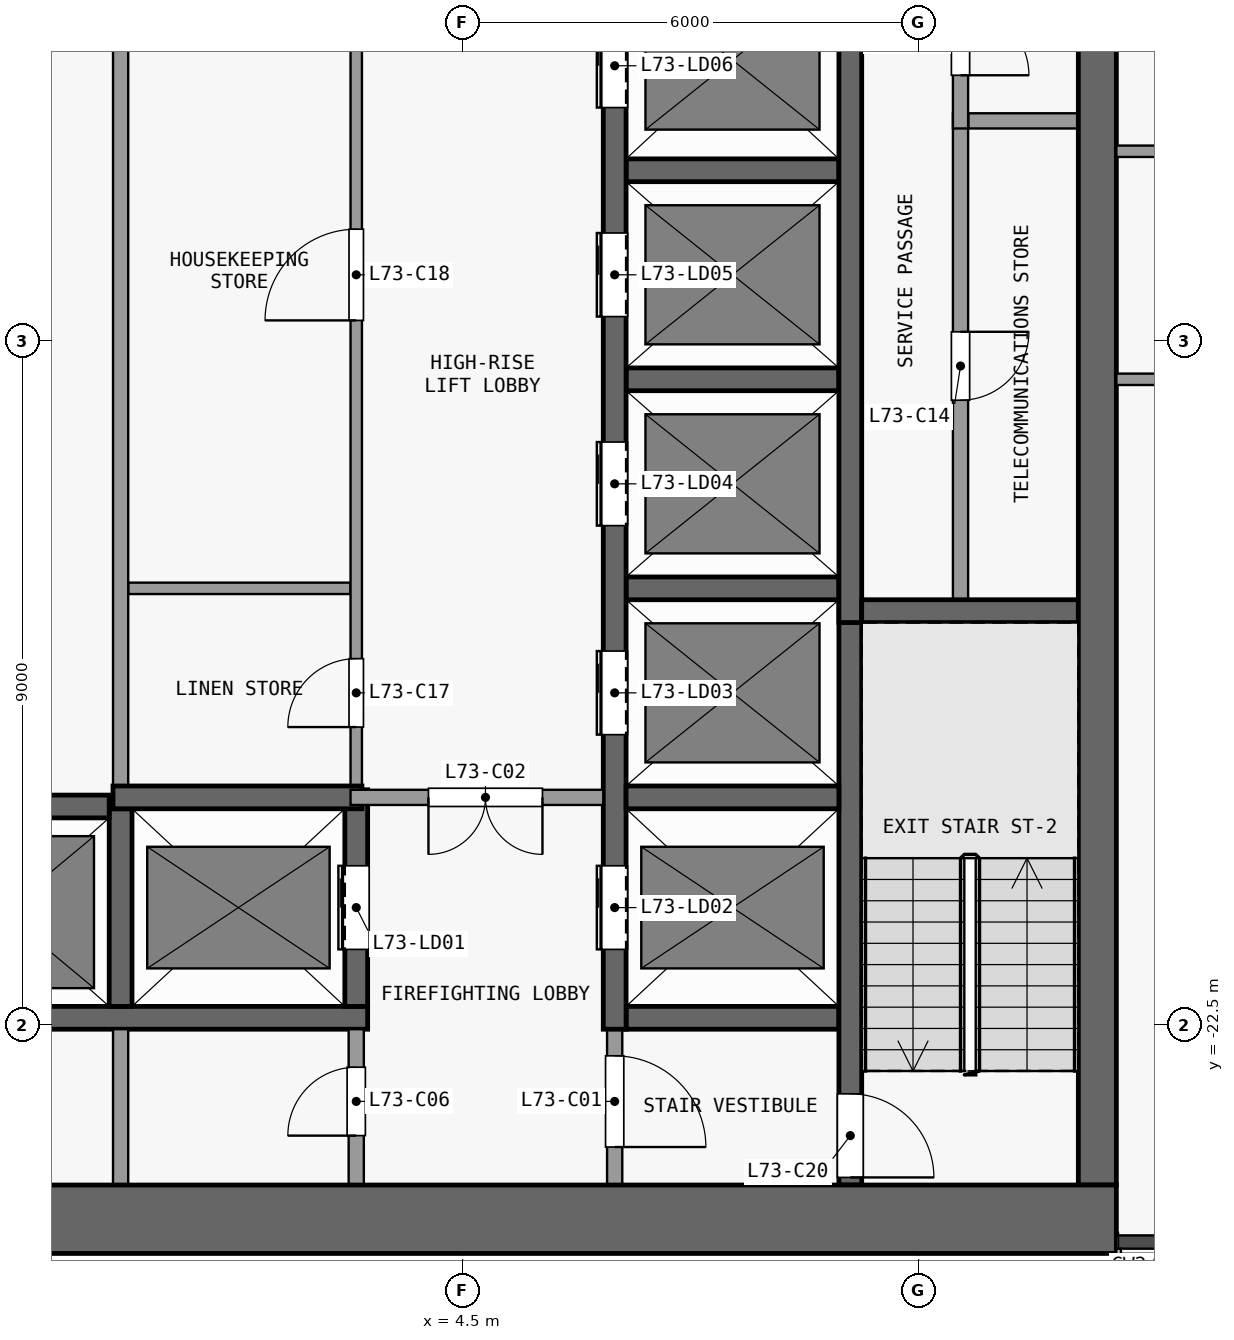
"""IFC4 building model, lengths in metres.
Left out: names, types, materials, properties, quantities, classifications, styles, units other than length and angle.
Written with IfcOpenShell. Run it as: python <this file> out.ifc"""

import sys

from ifc_helpers import new_model, si_unit, direction, frame, frame_2d, origin, place, context, subcontext, project, spatial, rectangle, extrude, element, fill, save


model = new_model("IFC4")
c1 = context("Model", 3, precision=1e-05, world=origin(), true_north=direction((0.0, 1.0)))
c2 = subcontext(c1, "Body", "Model", "MODEL_VIEW")
j1 = project(units=[si_unit("LENGTHUNIT", "METRE"), si_unit("PLANEANGLEUNIT", "RADIAN")], contexts=[c1])
p1 = place(None, origin())
s1 = spatial("IfcSite", under=j1, at=p1, CompositionType="ELEMENT")
p2 = place(p1, origin())
s2 = spatial("IfcBuilding", under=s1, at=p2, CompositionType="ELEMENT")
p3 = place(p2, frame((0.0, 0.0, 287.9)))
s3 = spatial("IfcBuildingStorey", under=s2, at=p3, CompositionType="ELEMENT", Elevation=287.9)
p4 = place(p3, frame((-13.1, -25.05, 0.0), z_axis=(0.0, 0.0, 1.0), x_axis=(1.0, 0.0, 0.0)))
e1 = element("IfcWall", 1, at=p4, inside=s3, PredefinedType="SHEAR", context=c2, shape_type="SweptSolid", body=[
    extrude(rectangle(XDim=26.2, YDim=0.9, at=frame_2d((13.1, 0.0))), origin(), (0.0, 0.0, 1.0), 3.3),
])
p5 = place(p3, frame((12.85, -24.6, 0.0), z_axis=(0.0, 0.0, 1.0), x_axis=(0.0, 1.0, 0.0)))
e2 = element("IfcWall", 2, at=p5, inside=s3, PredefinedType="SHEAR", context=c2, shape_type="SweptSolid", body=[
    extrude(rectangle(XDim=16.1, YDim=0.5, at=frame_2d((8.05, 0.0))), origin(), (0.0, 0.0, 1.0), 3.3),
])
p6 = place(p3, frame((-3.25, -22.4, 0.0), z_axis=(0.0, 0.0, 1.0), x_axis=(1.0, 0.0, 0.0)))
e3 = element("IfcWall", 3, at=p6, inside=s3, PredefinedType="SHEAR", context=c2, shape_type="SweptSolid", body=[
    extrude(rectangle(XDim=6.5, YDim=0.3, at=frame_2d((3.25, 0.0))), origin(), (0.0, 0.0, 1.0), 3.3),
])
p7 = place(p3, frame((6.65, -22.4, 0.0), z_axis=(0.0, 0.0, 1.0), x_axis=(1.0, 0.0, 0.0)))
e4 = element("IfcWall", 4, at=p7, inside=s3, PredefinedType="SHEAR", context=c2, shape_type="SweptSolid", body=[
    extrude(rectangle(XDim=2.8, YDim=0.3, at=frame_2d((1.4, 0.0))), origin(), (0.0, 0.0, 1.0), 3.3),
])
p8 = place(p3, frame((-3.2, -19.62, 0.0), z_axis=(0.0, 0.0, 1.0), x_axis=(1.0, 0.0, 0.0)))
e5 = element("IfcWall", 5, at=p8, inside=s3, PredefinedType="SHEAR", context=c2, shape_type="SweptSolid", body=[
    extrude(rectangle(XDim=3.05, YDim=0.3, at=frame_2d((1.525, 0.0))), origin(), (0.0, 0.0, 1.0), 3.3),
])
p9 = place(p3, frame((-0.1, -19.5, 0.0), z_axis=(0.0, 0.0, 1.0), x_axis=(1.0, 0.0, 0.0)))
e6 = element("IfcWall", 6, at=p9, inside=s3, PredefinedType="SHEAR", context=c2, shape_type="SweptSolid", body=[
    extrude(rectangle(XDim=3.275, YDim=0.3, at=frame_2d((1.638, 0.0))), origin(), (0.0, 0.0, 1.0), 3.3),
])
p10 = place(p3, frame((6.35, -19.5, 0.0), z_axis=(0.0, 0.0, 1.0), x_axis=(-1.0, 0.0, 0.0)))
e7 = element("IfcWall", 7, at=p10, inside=s3, PredefinedType="PARTITIONING", context=c2, shape_type="SweptSolid", body=[
    extrude(rectangle(XDim=3.325, YDim=0.2, at=frame_2d((1.663, 0.0))), origin(), (0.0, 0.0, 1.0), 3.3),
])
p11 = place(p10, frame((0.8, 0.0, 0.0)))
e8 = element("IfcOpeningElement", 8, at=p11, cuts=e7, PredefinedType="OPENING", context=c2, shape_type="SweptSolid", body=[
    extrude(rectangle(XDim=1.5, YDim=2.1, at=frame_2d((0.75, 1.05))), frame((0.0, 0.11, 0.0), z_axis=(0.0, -1.0, 0.0), x_axis=(1.0, 0.0, 0.0)), (0.0, 0.0, 1.0), 0.22),
])
p12 = place(p3, frame((6.65, -19.5, 0.0), z_axis=(0.0, 0.0, 1.0), x_axis=(1.0, 0.0, 0.0)))
e9 = element("IfcWall", 9, at=p12, inside=s3, PredefinedType="SHEAR", context=c2, shape_type="SweptSolid", body=[
    extrude(rectangle(XDim=2.8, YDim=0.3, at=frame_2d((1.4, 0.0))), origin(), (0.0, 0.0, 1.0), 3.3),
])
p13 = place(p3, frame((9.75, -17.05, 0.0), z_axis=(0.0, 0.0, 1.0), x_axis=(1.0, 0.0, 0.0)))
e10 = element("IfcWall", 10, at=p13, inside=s3, PredefinedType="SHEAR", context=c2, shape_type="SweptSolid", body=[
    extrude(rectangle(XDim=2.85, YDim=0.3, at=frame_2d((1.425, 0.0))), origin(), (0.0, 0.0, 1.0), 3.3),
])
p14 = place(p3, frame((0.1, -16.75, 0.0), z_axis=(0.0, 0.0, 1.0), x_axis=(1.0, 0.0, 0.0)))
e11 = element("IfcWall", 11, at=p14, inside=s3, PredefinedType="PARTITIONING", context=c2, shape_type="SweptSolid", body=[
    extrude(rectangle(XDim=2.925, YDim=0.15, at=frame_2d((1.462, 0.0))), origin(), (0.0, 0.0, 1.0), 3.3),
])
for number, where, z_axis, x_axis in (
    (12, (6.65, -16.75, 0.0), (0.0, 0.0, 1.0), (1.0, 0.0, 0.0)),
    (13, (6.65, -14.0, 0.0), (0.0, 0.0, 1.0), (1.0, 0.0, 0.0)),
    (14, (6.65, -11.25, 0.0), (0.0, 0.0, 1.0), (1.0, 0.0, 0.0)),
):
    element("IfcWall", number, at=place(p3, frame(where, z_axis=z_axis, x_axis=x_axis)), inside=s3, PredefinedType="SHEAR", context=c2, shape_type="SweptSolid", body=[
        extrude(rectangle(XDim=2.8, YDim=0.3, at=frame_2d((1.4, 0.0))), origin(), (0.0, 0.0, 1.0), 3.3),
    ])
p15 = place(p3, frame((11.15, -10.6, 0.0), z_axis=(0.0, 0.0, 1.0), x_axis=(1.0, 0.0, 0.0)))
e15 = element("IfcWall", 15, at=p15, inside=s3, PredefinedType="PARTITIONING", context=c2, shape_type="SweptSolid", body=[
    extrude(rectangle(XDim=1.45, YDim=0.2, at=frame_2d((0.725, 0.0))), origin(), (0.0, 0.0, 1.0), 3.3),
])
p16 = place(p3, frame((0.0, -24.6, 0.0), z_axis=(0.0, 0.0, 1.0), x_axis=(0.0, 1.0, 0.0)))
e16 = element("IfcWall", 16, at=p16, inside=s3, PredefinedType="PARTITIONING", context=c2, shape_type="SweptSolid", body=[
    extrude(rectangle(XDim=2.05, YDim=0.2, at=frame_2d((1.025, 0.0))), origin(), (0.0, 0.0, 1.0), 3.3),
])
p17 = place(p3, frame((0.0, -22.25, 0.0), z_axis=(0.0, 0.0, 1.0), x_axis=(0.0, 1.0, 0.0)))
e17 = element("IfcWall", 17, at=p17, inside=s3, PredefinedType="SHEAR", context=c2, shape_type="SweptSolid", body=[
    extrude(rectangle(XDim=2.6, YDim=0.3, at=frame_2d((1.3, 0.0))), origin(), (0.0, 0.0, 1.0), 3.3),
])
p18 = place(p3, frame((0.0, -19.35, 0.0), z_axis=(0.0, 0.0, 1.0), x_axis=(0.0, 1.0, 0.0)))
e18 = element("IfcWall", 18, at=p18, inside=s3, PredefinedType="PARTITIONING", context=c2, shape_type="SweptSolid", body=[
    extrude(rectangle(XDim=10.85, YDim=0.2, at=frame_2d((5.425, 0.0))), origin(), (0.0, 0.0, 1.0), 3.3),
])
p19 = place(p3, frame((3.1, -24.6, 0.0), z_axis=(0.0, 0.0, 1.0), x_axis=(0.0, 1.0, 0.0)))
e19 = element("IfcWall", 19, at=p19, inside=s3, PredefinedType="PARTITIONING", context=c2, shape_type="SweptSolid", body=[
    extrude(rectangle(XDim=2.05, YDim=0.2, at=frame_2d((1.025, 0.0))), origin(), (0.0, 0.0, 1.0), 3.3),
])
p20 = place(p19, frame((0.65, 0.0, 0.0)))
e20 = element("IfcOpeningElement", 20, at=p20, cuts=e19, PredefinedType="OPENING", context=c2, shape_type="SweptSolid", body=[
    extrude(rectangle(XDim=0.9, YDim=2.1, at=frame_2d((0.45, 1.05))), frame((0.0, 0.11, 0.0), z_axis=(0.0, -1.0, 0.0), x_axis=(1.0, 0.0, 0.0)), (0.0, 0.0, 1.0), 0.22),
])
p21 = place(p3, frame((3.1, -22.25, 0.0), z_axis=(0.0, 0.0, 1.0), x_axis=(0.0, 1.0, 0.0)))
e21 = element("IfcWall", 21, at=p21, inside=s3, PredefinedType="SHEAR", context=c2, shape_type="SweptSolid", body=[
    extrude(rectangle(XDim=2.85, YDim=0.3, at=frame_2d((1.425, 0.0))), origin(), (0.0, 0.0, 1.0), 3.3),
])
p22 = place(p21, frame((0.75, 0.0, 0.0)))
e22 = element("IfcOpeningElement", 22, at=p22, cuts=e21, PredefinedType="OPENING", context=c2, shape_type="SweptSolid", body=[
    extrude(rectangle(XDim=1.1, YDim=2.1, at=frame_2d((0.55, 1.05))), frame((0.0, 0.16, 0.0), z_axis=(0.0, -1.0, 0.0), x_axis=(1.0, 0.0, 0.0)), (0.0, 0.0, 1.0), 0.32),
])
p23 = place(p3, frame((3.1, -19.4, 0.0), z_axis=(0.0, 0.0, 1.0), x_axis=(0.0, 1.0, 0.0)))
e23 = element("IfcWall", 23, at=p23, inside=s3, PredefinedType="PARTITIONING", context=c2, shape_type="SweptSolid", body=[
    extrude(rectangle(XDim=10.9, YDim=0.15, at=frame_2d((5.45, 0.0))), origin(), (0.0, 0.0, 1.0), 3.3),
])
p24 = place(p23, frame((0.825, 0.0, 0.0)))
e24 = element("IfcOpeningElement", 24, at=p24, cuts=e23, PredefinedType="OPENING", context=c2, shape_type="SweptSolid", body=[
    extrude(rectangle(XDim=0.9, YDim=2.1, at=frame_2d((0.45, 1.05))), frame((0.0, 0.085, 0.0), z_axis=(0.0, -1.0, 0.0), x_axis=(1.0, 0.0, 0.0)), (0.0, 0.0, 1.0), 0.17),
])
p25 = place(p23, frame((6.175, 0.0, 0.0)))
e25 = element("IfcOpeningElement", 25, at=p25, cuts=e23, PredefinedType="OPENING", context=c2, shape_type="SweptSolid", body=[
    extrude(rectangle(XDim=1.2, YDim=2.1, at=frame_2d((0.6, 1.05))), frame((0.0, 0.085, 0.0), z_axis=(0.0, -1.0, 0.0), x_axis=(1.0, 0.0, 0.0)), (0.0, 0.0, 1.0), 0.17),
])
p26 = place(p3, frame((6.5, -22.55, 0.0), z_axis=(0.0, 0.0, 1.0), x_axis=(0.0, -1.0, 0.0)))
e26 = element("IfcWall", 26, at=p26, inside=s3, PredefinedType="PARTITIONING", context=c2, shape_type="SweptSolid", body=[
    extrude(rectangle(XDim=2.05, YDim=0.2, at=frame_2d((1.025, 0.0))), origin(), (0.0, 0.0, 1.0), 3.3),
])
p27 = place(p26, frame((0.35, 0.0, 0.0)))
e27 = element("IfcOpeningElement", 27, at=p27, cuts=e26, PredefinedType="OPENING", context=c2, shape_type="SweptSolid", body=[
    extrude(rectangle(XDim=1.2, YDim=2.1, at=frame_2d((0.6, 1.05))), frame((0.0, 0.11, 0.0), z_axis=(0.0, -1.0, 0.0), x_axis=(1.0, 0.0, 0.0)), (0.0, 0.0, 1.0), 0.22),
])
p28 = place(p3, frame((6.5, -22.55, 0.0), z_axis=(0.0, 0.0, 1.0), x_axis=(0.0, 1.0, 0.0)))
e28 = element("IfcWall", 28, at=p28, inside=s3, PredefinedType="SHEAR", context=c2, shape_type="SweptSolid", body=[
    extrude(rectangle(XDim=14.05, YDim=0.3, at=frame_2d((7.025, 0.0))), origin(), (0.0, 0.0, 1.0), 3.3),
])
p29 = place(p28, frame((1.05, 0.0, 0.0)))
e29 = element("IfcOpeningElement", 29, at=p29, cuts=e28, PredefinedType="OPENING", context=c2, shape_type="SweptSolid", body=[
    extrude(rectangle(XDim=1.1, YDim=2.1, at=frame_2d((0.55, 1.05))), frame((0.0, 0.16, 0.0), z_axis=(0.0, -1.0, 0.0), x_axis=(1.0, 0.0, 0.0)), (0.0, 0.0, 1.0), 0.32),
])
p30 = place(p28, frame((3.875, 0.0, 0.0)))
e30 = element("IfcOpeningElement", 30, at=p30, cuts=e28, PredefinedType="OPENING", context=c2, shape_type="SweptSolid", body=[
    extrude(rectangle(XDim=1.1, YDim=2.1, at=frame_2d((0.55, 1.05))), frame((0.0, 0.16, 0.0), z_axis=(0.0, -1.0, 0.0), x_axis=(1.0, 0.0, 0.0)), (0.0, 0.0, 1.0), 0.32),
])
p31 = place(p28, frame((6.625, 0.0, 0.0)))
e31 = element("IfcOpeningElement", 31, at=p31, cuts=e28, PredefinedType="OPENING", context=c2, shape_type="SweptSolid", body=[
    extrude(rectangle(XDim=1.1, YDim=2.1, at=frame_2d((0.55, 1.05))), frame((0.0, 0.16, 0.0), z_axis=(0.0, -1.0, 0.0), x_axis=(1.0, 0.0, 0.0)), (0.0, 0.0, 1.0), 0.32),
])
p32 = place(p28, frame((9.375, 0.0, 0.0)))
e32 = element("IfcOpeningElement", 32, at=p32, cuts=e28, PredefinedType="OPENING", context=c2, shape_type="SweptSolid", body=[
    extrude(rectangle(XDim=1.1, YDim=2.1, at=frame_2d((0.55, 1.05))), frame((0.0, 0.16, 0.0), z_axis=(0.0, -1.0, 0.0), x_axis=(1.0, 0.0, 0.0)), (0.0, 0.0, 1.0), 0.32),
])
p33 = place(p28, frame((12.125, 0.0, 0.0)))
e33 = element("IfcOpeningElement", 33, at=p33, cuts=e28, PredefinedType="OPENING", context=c2, shape_type="SweptSolid", body=[
    extrude(rectangle(XDim=1.1, YDim=2.1, at=frame_2d((0.55, 1.05))), frame((0.0, 0.16, 0.0), z_axis=(0.0, -1.0, 0.0), x_axis=(1.0, 0.0, 0.0)), (0.0, 0.0, 1.0), 0.32),
])
p34 = place(p3, frame((9.6, -16.9, 0.0), z_axis=(0.0, 0.0, 1.0), x_axis=(0.0, -1.0, 0.0)))
e34 = element("IfcWall", 34, at=p34, inside=s3, PredefinedType="SHEAR", context=c2, shape_type="SweptSolid", body=[
    extrude(rectangle(XDim=7.7, YDim=0.3, at=frame_2d((3.85, 0.0))), origin(), (0.0, 0.0, 1.0), 3.3),
])
p35 = place(p34, frame((6.5, 0.0, 0.0)))
e35 = element("IfcOpeningElement", 35, at=p35, cuts=e34, PredefinedType="OPENING", context=c2, shape_type="SweptSolid", body=[
    extrude(rectangle(XDim=1.1, YDim=2.1, at=frame_2d((0.55, 1.05))), frame((0.0, 0.16, 0.0), z_axis=(0.0, -1.0, 0.0), x_axis=(1.0, 0.0, 0.0)), (0.0, 0.0, 1.0), 0.32),
])
p36 = place(p3, frame((9.6, -17.2, 0.0), z_axis=(0.0, 0.0, 1.0), x_axis=(0.0, 1.0, 0.0)))
e36 = element("IfcWall", 36, at=p36, inside=s3, PredefinedType="SHEAR", context=c2, shape_type="SweptSolid", body=[
    extrude(rectangle(XDim=8.7, YDim=0.3, at=frame_2d((4.35, 0.0))), origin(), (0.0, 0.0, 1.0), 3.3),
])
p37 = place(p3, frame((11.05, -10.5, 0.0), z_axis=(0.0, 0.0, 1.0), x_axis=(0.0, -1.0, 0.0)))
e37 = element("IfcWall", 37, at=p37, inside=s3, PredefinedType="PARTITIONING", context=c2, shape_type="SweptSolid", body=[
    extrude(rectangle(XDim=6.4, YDim=0.2, at=frame_2d((3.2, 0.0))), origin(), (0.0, 0.0, 1.0), 3.3),
])
p38 = place(p37, frame((2.875, 0.0, 0.0)))
e38 = element("IfcOpeningElement", 38, at=p38, cuts=e37, PredefinedType="OPENING", context=c2, shape_type="SweptSolid", body=[
    extrude(rectangle(XDim=0.9, YDim=2.1, at=frame_2d((0.45, 1.05))), frame((0.0, 0.11, 0.0), z_axis=(0.0, -1.0, 0.0), x_axis=(1.0, 0.0, 0.0)), (0.0, 0.0, 1.0), 0.22),
])
p39 = place(p3, frame((11.05, -8.5, 0.0), z_axis=(0.0, 0.0, 1.0), x_axis=(0.0, -1.0, 0.0)))
e39 = element("IfcWall", 39, at=p39, inside=s3, PredefinedType="PARTITIONING", context=c2, shape_type="SweptSolid", body=[
    extrude(rectangle(XDim=2.2, YDim=0.2, at=frame_2d((1.1, 0.0))), origin(), (0.0, 0.0, 1.0), 3.3),
])
p40 = place(p39, frame((0.6, 0.0, 0.0)))
e40 = element("IfcOpeningElement", 40, at=p40, cuts=e39, PredefinedType="OPENING", context=c2, shape_type="SweptSolid", body=[
    extrude(rectangle(XDim=0.9, YDim=2.1, at=frame_2d((0.45, 1.05))), frame((0.0, 0.11, 0.0), z_axis=(0.0, -1.0, 0.0), x_axis=(1.0, 0.0, 0.0)), (0.0, 0.0, 1.0), 0.22),
])
p41 = place(p3, frame((13.1, -14.0, 0.0), z_axis=(0.0, 0.0, 1.0), x_axis=(1.0, 0.0, 0.0)))
e41 = element("IfcWall", 41, at=p41, inside=s3, PredefinedType="PARTITIONING", context=c2, shape_type="SweptSolid", body=[
    extrude(rectangle(XDim=6.162, YDim=0.15, at=frame_2d((3.081, 0.0))), origin(), (0.0, 0.0, 1.0), 3.3),
])
p42 = place(p41, frame((4.4, 0.0, 0.0)))
e42 = element("IfcOpeningElement", 42, at=p42, cuts=e41, PredefinedType="OPENING", context=c2, shape_type="SweptSolid", body=[
    extrude(rectangle(XDim=0.9, YDim=2.1, at=frame_2d((0.45, 1.05))), frame((0.0, 0.085, 0.0), z_axis=(0.0, -1.0, 0.0), x_axis=(1.0, 0.0, 0.0)), (0.0, 0.0, 1.0), 0.17),
])
p43 = place(p3, frame((13.1, -11.0, 0.0), z_axis=(0.0, 0.0, 1.0), x_axis=(1.0, 0.0, 0.0)))
e43 = element("IfcWall", 43, at=p43, inside=s3, PredefinedType="PARTITIONING", context=c2, shape_type="SweptSolid", body=[
    extrude(rectangle(XDim=6.162, YDim=0.15, at=frame_2d((3.081, 0.0))), origin(), (0.0, 0.0, 1.0), 3.3),
])
p44 = place(p43, frame((1.1, 0.0, 0.0)))
e44 = element("IfcOpeningElement", 44, at=p44, cuts=e43, PredefinedType="OPENING", context=c2, shape_type="SweptSolid", body=[
    extrude(rectangle(XDim=0.9, YDim=2.1, at=frame_2d((0.45, 1.05))), frame((0.0, 0.085, 0.0), z_axis=(0.0, -1.0, 0.0), x_axis=(1.0, 0.0, 0.0)), (0.0, 0.0, 1.0), 0.17),
])
p45 = place(p43, frame((4.2, 0.0, 0.0)))
e45 = element("IfcOpeningElement", 45, at=p45, cuts=e43, PredefinedType="OPENING", context=c2, shape_type="SweptSolid", body=[
    extrude(rectangle(XDim=0.9, YDim=2.1, at=frame_2d((0.45, 1.05))), frame((0.0, 0.085, 0.0), z_axis=(0.0, -1.0, 0.0), x_axis=(1.0, 0.0, 0.0)), (0.0, 0.0, 1.0), 0.17),
])
p46 = place(p22, origin())
e46 = element("IfcDoor", 46, at=p46, inside=s3, OperationType="DOUBLE_DOOR_SLIDING", PredefinedType="DOOR", context=c2, shape_type="SweptSolid", body=[
    extrude(rectangle(XDim=1.1, YDim=2.1, at=frame_2d((0.55, 1.05))), frame((0.0, 0.025, 0.0), z_axis=(0.0, -1.0, 0.0), x_axis=(1.0, 0.0, 0.0)), (0.0, 0.0, 1.0), 0.05),
])
fill(e22, e46)
p47 = place(p29, origin())
e47 = element("IfcDoor", 47, at=p47, inside=s3, OperationType="DOUBLE_DOOR_SLIDING", PredefinedType="DOOR", context=c2, shape_type="SweptSolid", body=[
    extrude(rectangle(XDim=1.1, YDim=2.1, at=frame_2d((0.55, 1.05))), frame((0.0, 0.025, 0.0), z_axis=(0.0, -1.0, 0.0), x_axis=(1.0, 0.0, 0.0)), (0.0, 0.0, 1.0), 0.05),
])
fill(e29, e47)
p48 = place(p30, origin())
e48 = element("IfcDoor", 48, at=p48, inside=s3, OperationType="DOUBLE_DOOR_SLIDING", PredefinedType="DOOR", context=c2, shape_type="SweptSolid", body=[
    extrude(rectangle(XDim=1.1, YDim=2.1, at=frame_2d((0.55, 1.05))), frame((0.0, 0.025, 0.0), z_axis=(0.0, -1.0, 0.0), x_axis=(1.0, 0.0, 0.0)), (0.0, 0.0, 1.0), 0.05),
])
fill(e30, e48)
p49 = place(p31, origin())
e49 = element("IfcDoor", 49, at=p49, inside=s3, OperationType="DOUBLE_DOOR_SLIDING", PredefinedType="DOOR", context=c2, shape_type="SweptSolid", body=[
    extrude(rectangle(XDim=1.1, YDim=2.1, at=frame_2d((0.55, 1.05))), frame((0.0, 0.025, 0.0), z_axis=(0.0, -1.0, 0.0), x_axis=(1.0, 0.0, 0.0)), (0.0, 0.0, 1.0), 0.05),
])
fill(e31, e49)
p50 = place(p32, origin())
e50 = element("IfcDoor", 50, at=p50, inside=s3, OperationType="DOUBLE_DOOR_SLIDING", PredefinedType="DOOR", context=c2, shape_type="SweptSolid", body=[
    extrude(rectangle(XDim=1.1, YDim=2.1, at=frame_2d((0.55, 1.05))), frame((0.0, 0.025, 0.0), z_axis=(0.0, -1.0, 0.0), x_axis=(1.0, 0.0, 0.0)), (0.0, 0.0, 1.0), 0.05),
])
fill(e32, e50)
p51 = place(p33, origin())
e51 = element("IfcDoor", 51, at=p51, inside=s3, OperationType="DOUBLE_DOOR_SLIDING", PredefinedType="DOOR", context=c2, shape_type="SweptSolid", body=[
    extrude(rectangle(XDim=1.1, YDim=2.1, at=frame_2d((0.55, 1.05))), frame((0.0, 0.025, 0.0), z_axis=(0.0, -1.0, 0.0), x_axis=(1.0, 0.0, 0.0)), (0.0, 0.0, 1.0), 0.05),
])
fill(e33, e51)
p52 = place(p27, origin())
e52 = element("IfcDoor", 52, at=p52, inside=s3, OperationType="SINGLE_SWING_RIGHT", PredefinedType="DOOR", context=c2, shape_type="SweptSolid", body=[
    extrude(rectangle(XDim=1.2, YDim=2.1, at=frame_2d((0.6, 1.05))), frame((0.0, 0.025, 0.0), z_axis=(0.0, -1.0, 0.0), x_axis=(1.0, 0.0, 0.0)), (0.0, 0.0, 1.0), 0.05),
])
fill(e27, e52)
p53 = place(p11, origin())
e53 = element("IfcDoor", 53, at=p53, inside=s3, OperationType="DOUBLE_DOOR_SINGLE_SWING", PredefinedType="DOOR", context=c2, shape_type="SweptSolid", body=[
    extrude(rectangle(XDim=1.5, YDim=2.1, at=frame_2d((0.75, 1.05))), frame((0.0, 0.025, 0.0), z_axis=(0.0, -1.0, 0.0), x_axis=(1.0, 0.0, 0.0)), (0.0, 0.0, 1.0), 0.05),
])
fill(e8, e53)
p54 = place(p20, origin())
e54 = element("IfcDoor", 54, at=p54, inside=s3, OperationType="SINGLE_SWING_LEFT", PredefinedType="DOOR", context=c2, shape_type="SweptSolid", body=[
    extrude(rectangle(XDim=0.9, YDim=2.1, at=frame_2d((0.45, 1.05))), frame((0.0, 0.025, 0.0), z_axis=(0.0, -1.0, 0.0), x_axis=(1.0, 0.0, 0.0)), (0.0, 0.0, 1.0), 0.05),
])
fill(e20, e54)
p55 = place(p40, origin())
e55 = element("IfcDoor", 55, at=p55, inside=s3, OperationType="SINGLE_SWING_RIGHT", PredefinedType="DOOR", context=c2, shape_type="SweptSolid", body=[
    extrude(rectangle(XDim=0.9, YDim=2.1, at=frame_2d((0.45, 1.05))), frame((0.0, 0.025, 0.0), z_axis=(0.0, -1.0, 0.0), x_axis=(1.0, 0.0, 0.0)), (0.0, 0.0, 1.0), 0.05),
])
fill(e40, e55)
p56 = place(p38, origin())
e56 = element("IfcDoor", 56, at=p56, inside=s3, OperationType="SINGLE_SWING_LEFT", PredefinedType="DOOR", context=c2, shape_type="SweptSolid", body=[
    extrude(rectangle(XDim=0.9, YDim=2.1, at=frame_2d((0.45, 1.05))), frame((0.0, 0.025, 0.0), z_axis=(0.0, -1.0, 0.0), x_axis=(1.0, 0.0, 0.0)), (0.0, 0.0, 1.0), 0.05),
])
fill(e38, e56)
p57 = place(p24, origin())
e57 = element("IfcDoor", 57, at=p57, inside=s3, OperationType="SINGLE_SWING_LEFT", PredefinedType="DOOR", context=c2, shape_type="SweptSolid", body=[
    extrude(rectangle(XDim=0.9, YDim=2.1, at=frame_2d((0.45, 1.05))), frame((0.0, 0.025, 0.0), z_axis=(0.0, -1.0, 0.0), x_axis=(1.0, 0.0, 0.0)), (0.0, 0.0, 1.0), 0.05),
])
fill(e24, e57)
p58 = place(p25, origin())
e58 = element("IfcDoor", 58, at=p58, inside=s3, OperationType="SINGLE_SWING_LEFT", PredefinedType="DOOR", context=c2, shape_type="SweptSolid", body=[
    extrude(rectangle(XDim=1.2, YDim=2.1, at=frame_2d((0.6, 1.05))), frame((0.0, 0.025, 0.0), z_axis=(0.0, -1.0, 0.0), x_axis=(1.0, 0.0, 0.0)), (0.0, 0.0, 1.0), 0.05),
])
fill(e25, e58)
p59 = place(p35, origin())
e59 = element("IfcDoor", 59, at=p59, inside=s3, OperationType="SINGLE_SWING_RIGHT", PredefinedType="DOOR", context=c2, shape_type="SweptSolid", body=[
    extrude(rectangle(XDim=1.1, YDim=2.1, at=frame_2d((0.55, 1.05))), frame((0.0, 0.025, 0.0), z_axis=(0.0, -1.0, 0.0), x_axis=(1.0, 0.0, 0.0)), (0.0, 0.0, 1.0), 0.05),
])
fill(e35, e59)
save(model, sys.argv[1])
